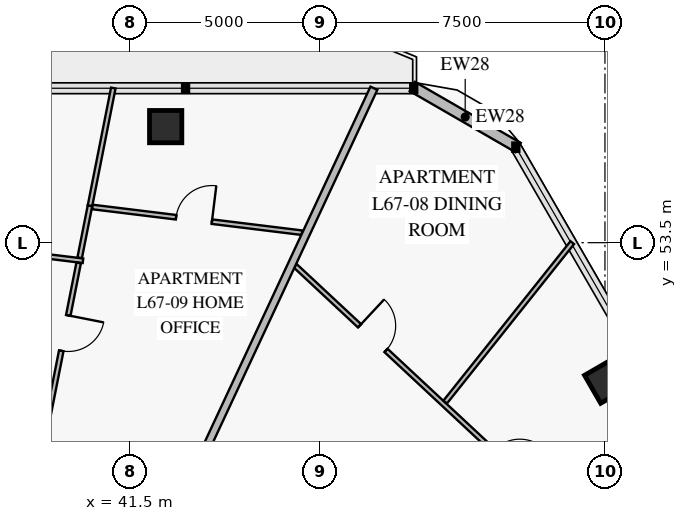
"""IFC4 building model, lengths in metres.
Left out: names, types, materials, properties, quantities, classifications, styles, units other than length and angle.
Written with IfcOpenShell. Run it as: python <this file> out.ifc"""

import sys

from ifc_helpers import new_model, si_unit, direction, frame, frame_2d, origin, origin_2d, place, context, subcontext, project, spatial, rectangle, extrude, element, fill, save


model = new_model("IFC4")
c1 = context("Model", 3, precision=1e-05, world=origin(), true_north=direction((0.0, 1.0)))
c2 = subcontext(c1, "Body", "Model", "MODEL_VIEW")
j1 = project(units=[si_unit("LENGTHUNIT", "METRE"), si_unit("PLANEANGLEUNIT", "RADIAN")], contexts=[c1])
p1 = place(None, origin())
s1 = spatial("IfcSite", under=j1, at=p1, CompositionType="ELEMENT")
p2 = place(p1, origin())
s2 = spatial("IfcBuilding", under=s1, at=p2, CompositionType="ELEMENT")
p3 = place(p2, frame((0.0, 0.0, 265.4)))
s3 = spatial("IfcBuildingStorey", under=s2, at=p3, CompositionType="ELEMENT", Elevation=265.4)
for number, where, z_axis, x_axis in (
    (1, (54.044, 49.855, 0.0), (0.0, 0.0, 1.0), (-0.5, 0.866, 0.0)),
    (2, (42.441, 56.554, 0.0), (0.0, 0.0, 1.0), (-1.0, 0.0, 0.0)),
):
    element("IfcColumn", number, at=place(p3, frame(where, z_axis=z_axis, x_axis=x_axis)), inside=s3, PredefinedType="COLUMN", context=c2, shape_type="SweptSolid", body=[
        extrude(rectangle(XDim=0.85, YDim=0.85, at=origin_2d()), origin(), (0.0, 0.0, 1.0), 3.55),
    ])
p4 = place(p3, frame((48.93, 57.611, 0.0), z_axis=(0.0, 0.0, 1.0), x_axis=(0.866028773314, -0.499994163758, 0.0)))
e3 = element("IfcWall", 3, at=p4, inside=s3, PredefinedType="SOLIDWALL", context=c2, shape_type="SweptSolid", body=[
    extrude(rectangle(XDim=3.215, YDim=0.28, at=frame_2d((1.607, 0.0))), origin(), (0.0, 0.0, 1.0), 3.55),
])
p5 = place(p3, frame((53.25, 45.99, 0.0), z_axis=(0.0, 0.0, 1.0), x_axis=(-0.731343343845, 0.682009467246, 0.0)))
e4 = element("IfcWall", 4, at=p5, inside=s3, PredefinedType="PARTITIONING", context=c2, shape_type="SweptSolid", body=[
    extrude(rectangle(XDim=10.115, YDim=0.12, at=frame_2d((5.058, 0.0))), origin(), (0.0, 0.0, 1.0), 2.95),
])
p6 = place(p5, frame((2.037, 0.0, 0.0)))
e5 = element("IfcOpeningElement", 5, at=p6, cuts=e4, PredefinedType="OPENING", context=c2, shape_type="SweptSolid", body=[
    extrude(rectangle(XDim=0.95, YDim=2.1, at=frame_2d((0.475, 1.05))), frame((0.0, 0.072, 0.0), z_axis=(0.0, -1.0, 0.0), x_axis=(1.0, 0.0, 0.0)), (0.0, 0.0, 1.0), 0.144),
])
p7 = place(p5, frame((6.854, 0.0, 0.0)))
e6 = element("IfcOpeningElement", 6, at=p7, cuts=e4, PredefinedType="OPENING", context=c2, shape_type="SweptSolid", body=[
    extrude(rectangle(XDim=0.95, YDim=2.1, at=frame_2d((0.475, 1.05))), frame((0.0, 0.072, 0.0), z_axis=(0.0, -1.0, 0.0), x_axis=(1.0, 0.0, 0.0)), (0.0, 0.0, 1.0), 0.144),
])
p8 = place(p3, frame((53.229, 46.102, 0.0), z_axis=(0.0, 0.0, 1.0), x_axis=(0.773858778819, 0.633358184951, 0.0)))
e7 = element("IfcWall", 7, at=p8, inside=s3, PredefinedType="PARTITIONING", context=c2, shape_type="SweptSolid", body=[
    extrude(rectangle(XDim=3.644, YDim=0.12, at=frame_2d((1.822, 0.0))), origin(), (0.0, 0.0, 1.0), 2.93),
])
p9 = place(p3, frame((40.265, 53.024, 0.0), z_axis=(0.0, 0.0, 1.0), x_axis=(-0.992544489296, 0.121882881359, 0.0)))
e8 = element("IfcWall", 8, at=p9, inside=s3, PredefinedType="PARTITIONING", context=c2, shape_type="SweptSolid", body=[
    extrude(rectangle(XDim=8.519, YDim=0.12, at=frame_2d((4.26, 0.0))), origin(), (0.0, 0.0, 1.0), 3.55),
])
p10 = place(p9, frame((3.784, 0.0, 0.0)))
e9 = element("IfcOpeningElement", 9, at=p10, cuts=e8, PredefinedType="OPENING", context=c2, shape_type="SweptSolid", body=[
    extrude(rectangle(XDim=0.95, YDim=2.1, at=frame_2d((0.475, 1.05))), frame((0.0, 0.072, 0.0), z_axis=(0.0, -1.0, 0.0), x_axis=(1.0, 0.0, 0.0)), (0.0, 0.0, 1.0), 0.144),
])
p11 = place(p3, frame((39.132, 47.818, 0.0), z_axis=(0.0, 0.0, 1.0), x_axis=(0.194247124133, 0.980952626158, 0.0)))
e10 = element("IfcWall", 10, at=p11, inside=s3, PredefinedType="PARTITIONING", context=c2, shape_type="SweptSolid", body=[
    extrude(rectangle(XDim=5.251, YDim=0.12, at=frame_2d((2.625, 0.0))), origin(), (0.0, 0.0, 1.0), 3.15),
])
p12 = place(p11, frame((2.892, 0.0, 0.0)))
e11 = element("IfcOpeningElement", 11, at=p12, cuts=e10, PredefinedType="OPENING", context=c2, shape_type="SweptSolid", body=[
    extrude(rectangle(XDim=0.95, YDim=2.1, at=frame_2d((0.475, 1.05))), frame((0.0, 0.072, 0.0), z_axis=(0.0, -1.0, 0.0), x_axis=(1.0, 0.0, 0.0)), (0.0, 0.0, 1.0), 0.144),
])
p13 = place(p3, frame((40.178, 53.103, 0.0), z_axis=(0.0, 0.0, 1.0), x_axis=(0.194299662618, 0.980942221085, 0.0)))
e12 = element("IfcWall", 12, at=p13, inside=s3, PredefinedType="PARTITIONING", context=c2, shape_type="SweptSolid", body=[
    extrude(rectangle(XDim=1.396, YDim=0.12, at=frame_2d((0.698, 0.0))), origin(), (0.0, 0.0, 1.0), 3.55),
])
p14 = place(p3, frame((46.028, 53.762, 0.0), z_axis=(0.0, 0.0, 1.0), x_axis=(-0.992544574318, 0.121882188984, 0.0)))
e13 = element("IfcWall", 13, at=p14, inside=s3, PredefinedType="PARTITIONING", context=c2, shape_type="SweptSolid", body=[
    extrude(rectangle(XDim=5.557, YDim=0.12, at=frame_2d((2.778, 0.0))), origin(), (0.0, 0.0, 1.0), 2.95),
])
p15 = place(p14, frame((2.387, 0.0, 0.0)))
e14 = element("IfcOpeningElement", 14, at=p15, cuts=e13, PredefinedType="OPENING", context=c2, shape_type="SweptSolid", body=[
    extrude(rectangle(XDim=0.95, YDim=2.1, at=frame_2d((0.475, 1.05))), frame((0.0, 0.072, 0.0), z_axis=(0.0, -1.0, 0.0), x_axis=(1.0, 0.0, 0.0)), (0.0, 0.0, 1.0), 0.144),
])
p16 = place(p3, frame((49.795, 49.305, 0.0), z_axis=(0.0, 0.0, 1.0), x_axis=(0.623334583936, 0.781955239429, 0.0)))
e15 = element("IfcWall", 15, at=p16, inside=s3, PredefinedType="PARTITIONING", context=c2, shape_type="SweptSolid", body=[
    extrude(rectangle(XDim=5.365, YDim=0.12, at=frame_2d((2.683, 0.0))), origin(), (0.0, 0.0, 1.0), 2.93),
])
p17 = place(p3, frame((41.591, 43.99, 0.0), z_axis=(0.0, 0.0, 1.0), x_axis=(0.422607909104, 0.906312614479, 0.0)))
e16 = element("IfcWall", 16, at=p17, inside=s3, PredefinedType="PARTITIONING", context=c2, shape_type="SweptSolid", body=[
    extrude(rectangle(XDim=14.977, YDim=0.2, at=frame_2d((7.488, 0.0))), origin(), (0.0, 0.0, 1.0), 2.93),
])
p18 = place(p3, frame((40.45, 54.472, 0.0), z_axis=(0.0, 0.0, 1.0), x_axis=(0.194226638518, 0.980956682474, 0.0)))
e17 = element("IfcWall", 17, at=p18, inside=s3, PredefinedType="PARTITIONING", context=c2, shape_type="SweptSolid", body=[
    extrude(rectangle(XDim=3.156, YDim=0.12, at=frame_2d((1.578, 0.0))), origin(), (0.0, 0.0, 1.0), 2.93),
])
p19 = place(p7, frame((0.95, 0.0, 0.0), z_axis=(0.0, 0.0, 1.0), x_axis=(-1.0, 0.0, 0.0)))
e18 = element("IfcDoor", 18, at=p19, inside=s3, OperationType="SINGLE_SWING_LEFT", PredefinedType="DOOR", context=c2, shape_type="SweptSolid", body=[
    extrude(rectangle(XDim=0.95, YDim=2.1, at=frame_2d((0.475, 1.05))), frame((0.0, 0.025, 0.0), z_axis=(0.0, -1.0, 0.0), x_axis=(1.0, 0.0, 0.0)), (0.0, 0.0, 1.0), 0.05),
])
fill(e6, e18)
p20 = place(p12, frame((0.95, 0.0, 0.0), z_axis=(0.0, 0.0, 1.0), x_axis=(-1.0, 0.0, 0.0)))
e19 = element("IfcDoor", 19, at=p20, inside=s3, OperationType="SINGLE_SWING_LEFT", PredefinedType="DOOR", context=c2, shape_type="SweptSolid", body=[
    extrude(rectangle(XDim=0.95, YDim=2.1, at=frame_2d((0.475, 1.05))), frame((0.0, 0.025, 0.0), z_axis=(0.0, -1.0, 0.0), x_axis=(1.0, 0.0, 0.0)), (0.0, 0.0, 1.0), 0.05),
])
fill(e11, e19)
p21 = place(p15, frame((0.95, 0.0, 0.0), z_axis=(0.0, 0.0, 1.0), x_axis=(-1.0, 0.0, 0.0)))
e20 = element("IfcDoor", 20, at=p21, inside=s3, OperationType="SINGLE_SWING_RIGHT", PredefinedType="DOOR", context=c2, shape_type="SweptSolid", body=[
    extrude(rectangle(XDim=0.95, YDim=2.1, at=frame_2d((0.475, 1.05))), frame((0.0, 0.025, 0.0), z_axis=(0.0, -1.0, 0.0), x_axis=(1.0, 0.0, 0.0)), (0.0, 0.0, 1.0), 0.05),
])
fill(e14, e20)
save(model, sys.argv[1])
